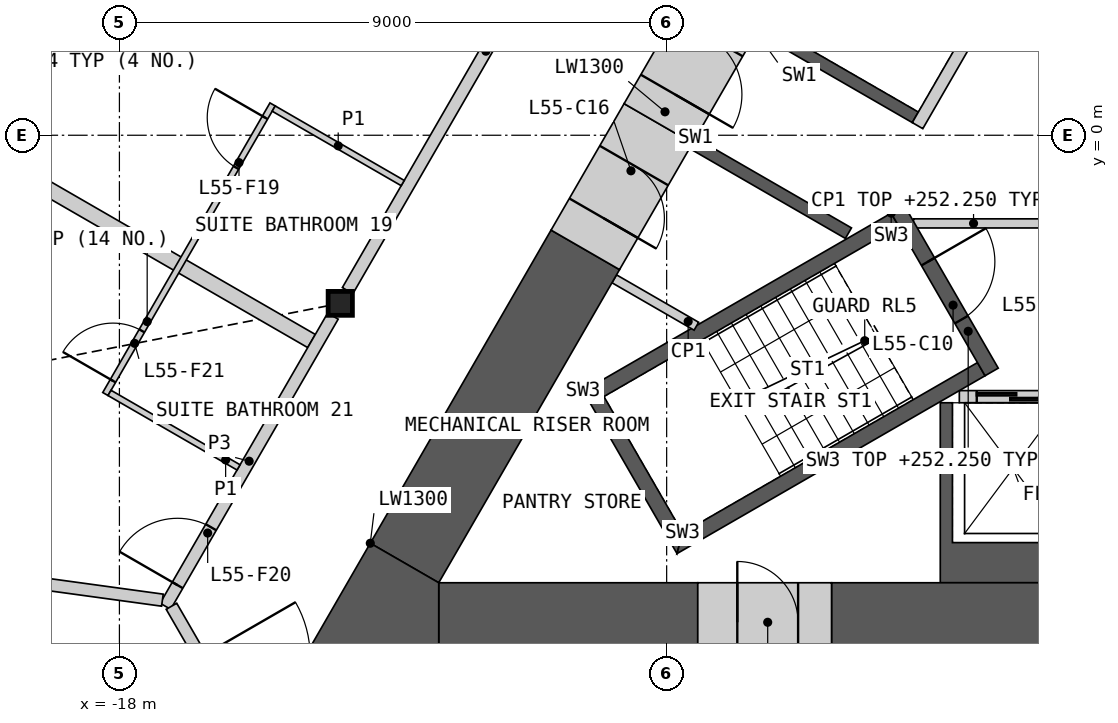
"""IFC4 building model, lengths in metres.
Left out: names, types, materials, properties, quantities, classifications, styles, units other than length and angle.
Written with IfcOpenShell. Run it as: python <this file> out.ifc"""

import sys

from ifc_helpers import new_model, si_unit, direction, frame, frame_2d, origin, origin_2d, place, context, subcontext, project, spatial, polyline, rectangle, i_section, outline, extrude, element, fill, save


model = new_model("IFC4")
c1 = context("Model", 3, precision=1e-05, world=origin(), true_north=direction((0.0, 1.0)))
c2 = subcontext(c1, "Body", "Model", "MODEL_VIEW")
j1 = project(units=[si_unit("LENGTHUNIT", "METRE"), si_unit("PLANEANGLEUNIT", "RADIAN")], contexts=[c1])
p1 = place(None, origin())
s1 = spatial("IfcSite", under=j1, at=p1, CompositionType="ELEMENT")
p2 = place(p1, origin())
s2 = spatial("IfcBuilding", under=s1, at=p2, CompositionType="ELEMENT")
p3 = place(p2, frame((0.0, 0.0, 249.0)))
s3 = spatial("IfcBuildingStorey", under=s2, at=p3, CompositionType="ELEMENT", Elevation=249.0)
p4 = place(p3, frame((-14.368, -2.765, 0.0), z_axis=(0.0, 0.0, 1.0), x_axis=(1.0, 0.0, 0.0)))
e1 = element("IfcColumn", 1, at=p4, inside=s3, PredefinedType="COLUMN", context=c2, shape_type="SweptSolid", body=[
    extrude(i_section(OverallWidth=0.399, OverallDepth=0.393, WebThickness=0.023, FlangeThickness=0.037, at=origin_2d()), origin(), (0.0, 0.0, 1.0), 3.6),
])
p5 = place(p3, origin())
e2 = element("IfcWall", 2, at=p5, inside=s3, PredefinedType="SHEAR", context=c2, shape_type="SweptSolid", body=[
    extrude(outline(polyline([(0.1, -7.36), (-4.5, -7.36), (-4.5, -4.4), (-4.3, -4.4), (-4.3, -6.7), (-2.3, -6.7), (-2.3, -4.4), (-2.1, -4.4), (-2.1, -6.7), (-0.1, -6.7), (-0.1, -4.4), (0.1, -4.4), (0.1, -7.36)])), origin(), (0.0, 0.0, 1.0), 3.25),
])
p6 = place(p3, frame((-4.187, -4.3, 0.0), z_axis=(0.0, 0.0, 1.0), x_axis=(1.0, 0.0, 0.0)))
e3 = element("IfcWall", 3, at=p6, inside=s3, PredefinedType="SOLIDWALL", context=c2, shape_type="SweptSolid", body=[
    extrude(rectangle(XDim=8.373, YDim=0.2, at=frame_2d((4.187, 0.0))), origin(), (0.0, 0.0, 1.0), 3.25),
])
p7 = place(p6, frame((0.287, 0.0, 0.0)))
e4 = element("IfcOpeningElement", 4, at=p7, cuts=e3, PredefinedType="OPENING", context=c2, shape_type="SweptSolid", body=[
    extrude(rectangle(XDim=1.2, YDim=2.1, at=frame_2d((0.6, 1.05))), frame((0.0, 0.11, 0.0), z_axis=(0.0, -1.0, 0.0), x_axis=(1.0, 0.0, 0.0)), (0.0, 0.0, 1.0), 0.22),
])
p8 = place(p6, frame((2.387, 0.0, 0.0)))
e5 = element("IfcOpeningElement", 5, at=p8, cuts=e3, PredefinedType="OPENING", context=c2, shape_type="SweptSolid", body=[
    extrude(rectangle(XDim=1.4, YDim=2.1, at=frame_2d((0.7, 1.05))), frame((0.0, 0.11, 0.0), z_axis=(0.0, -1.0, 0.0), x_axis=(1.0, 0.0, 0.0)), (0.0, 0.0, 1.0), 0.22),
])
p9 = place(p6, frame((4.837, 0.0, 0.0)))
e6 = element("IfcOpeningElement", 6, at=p9, cuts=e3, PredefinedType="OPENING", context=c2, shape_type="SweptSolid", body=[
    extrude(rectangle(XDim=0.9, YDim=2.1, at=frame_2d((0.45, 1.05))), frame((0.0, 0.11, 0.0), z_axis=(0.0, -1.0, 0.0), x_axis=(1.0, 0.0, 0.0)), (0.0, 0.0, 1.0), 0.22),
])
p10 = place(p6, frame((6.887, 0.0, 0.0)))
e7 = element("IfcOpeningElement", 7, at=p10, cuts=e3, PredefinedType="OPENING", context=c2, shape_type="SweptSolid", body=[
    extrude(rectangle(XDim=1.2, YDim=2.1, at=frame_2d((0.6, 1.05))), frame((0.0, 0.11, 0.0), z_axis=(0.0, -1.0, 0.0), x_axis=(1.0, 0.0, 0.0)), (0.0, 0.0, 1.0), 0.22),
])
p11 = place(p3, origin())
e8 = element("IfcWall", 8, at=p11, inside=s3, PredefinedType="SHEAR", context=c2, shape_type="SweptSolid", body=[
    extrude(outline(polyline([(-7.524, 1.688), (-4.124, 7.577), (-3.731, 7.35), (-1.561, 6.097), (-1.66, 5.924), (-3.652, 7.074), (-4.652, 5.342), (-2.66, 4.192), (-2.76, 4.019), (-4.752, 5.169), (-5.752, 3.437), (-3.76, 2.287), (-3.861, 2.113), (-5.852, 3.263), (-6.852, 1.531), (-4.861, 0.381), (-4.96, 0.208), (-7.131, 1.461), (-7.524, 1.688)])), origin(), (0.0, 0.0, 1.0), 3.25),
])
p12 = place(p3, origin())
e9 = element("IfcWall", 9, at=p12, inside=s3, PredefinedType="SHEAR", context=c2, shape_type="SweptSolid", body=[
    extrude(outline(polyline([(-8.524, -0.044), (-8.131, -0.271), (-5.96, -1.524), (-6.061, -1.697), (-8.231, -0.444), (-8.624, -0.217), (-8.524, -0.044)])), origin(), (0.0, 0.0, 1.0), 3.25),
])
p13 = place(p3, frame((-1.631, 5.776, 0.0), z_axis=(0.0, 0.0, 1.0), x_axis=(-0.499992876559, -0.866029516466, 0.0)))
e10 = element("IfcWall", 10, at=p13, inside=s3, PredefinedType="SOLIDWALL", context=c2, shape_type="SweptSolid", body=[
    extrude(rectangle(XDim=6.486, YDim=0.2, at=frame_2d((3.243, 0.0))), origin(), (0.0, 0.0, 1.0), 3.25),
])
p14 = place(p13, frame((0.337, 0.0, 0.0)))
e11 = element("IfcOpeningElement", 11, at=p14, cuts=e10, PredefinedType="OPENING", context=c2, shape_type="SweptSolid", body=[
    extrude(rectangle(XDim=1.1, YDim=2.1, at=frame_2d((0.55, 1.05))), frame((0.0, 0.11, 0.0), z_axis=(0.0, -1.0, 0.0), x_axis=(1.0, 0.0, 0.0)), (0.0, 0.0, 1.0), 0.22),
])
p15 = place(p13, frame((2.537, 0.0, 0.0)))
e12 = element("IfcOpeningElement", 12, at=p15, cuts=e10, PredefinedType="OPENING", context=c2, shape_type="SweptSolid", body=[
    extrude(rectangle(XDim=1.1, YDim=2.1, at=frame_2d((0.55, 1.05))), frame((0.0, 0.11, 0.0), z_axis=(0.0, -1.0, 0.0), x_axis=(1.0, 0.0, 0.0)), (0.0, 0.0, 1.0), 0.22),
])
p16 = place(p3, frame((-4.941, -1.45, 0.0), z_axis=(0.0, 0.0, 1.0), x_axis=(1.0, 0.0, 0.0)))
e13 = element("IfcWall", 13, at=p16, inside=s3, PredefinedType="PARTITIONING", context=c2, shape_type="SweptSolid", body=[
    extrude(rectangle(XDim=9.882, YDim=0.15, at=frame_2d((4.941, 0.0))), origin(), (0.0, 0.0, 1.0), 3.25),
])
p17 = place(p16, frame((4.391, 0.0, 0.0)))
e14 = element("IfcOpeningElement", 14, at=p17, cuts=e13, PredefinedType="OPENING", context=c2, shape_type="SweptSolid", body=[
    extrude(rectangle(XDim=1.1, YDim=2.1, at=frame_2d((0.55, 1.05))), frame((0.0, 0.085, 0.0), z_axis=(0.0, -1.0, 0.0), x_axis=(1.0, 0.0, 0.0)), (0.0, 0.0, 1.0), 0.17),
])
p18 = place(p3, origin())
e15 = element("IfcWall", 15, at=p18, inside=s3, PredefinedType="SHEAR", context=c2, shape_type="SweptSolid", body=[
    extrude(outline(polyline([(-5.307, -1.281), (-10.374, -4.206), (-10.032, -4.298), (-5.182, -1.498), (-5.307, -1.281)])), origin(), (0.0, 0.0, 1.0), 3.25),
])
p19 = place(p3, origin())
e16 = element("IfcWall", 16, at=p19, inside=s3, PredefinedType="SHEAR", context=c2, shape_type="SweptSolid", body=[
    extrude(outline(polyline([(-10.374, -4.206), (-8.83, -6.881), (-8.738, -6.539), (-10.032, -4.298), (-10.374, -4.206)])), origin(), (0.0, 0.0, 1.0), 3.25),
])
p20 = place(p3, origin())
e17 = element("IfcWall", 17, at=p20, inside=s3, PredefinedType="SHEAR", context=c2, shape_type="SweptSolid", body=[
    extrude(outline(polyline([(-8.738, -6.539), (-8.83, -6.881), (-3.763, -3.956), (-3.888, -3.739), (-8.738, -6.539)])), origin(), (0.0, 0.0, 1.0), 3.25),
])
p21 = place(p3, frame((-5.199, -1.219, 0.0), z_axis=(0.0, 0.0, 1.0), x_axis=(0.499982516597, -0.866035497597, 0.0)))
e18 = element("IfcWall", 18, at=p21, inside=s3, PredefinedType="SHEAR", context=c2, shape_type="SweptSolid", body=[
    extrude(rectangle(XDim=3.088, YDim=0.25, at=frame_2d((1.544, 0.0))), origin(), (0.0, 0.0, 1.0), 3.25),
])
p22 = place(p21, frame((0.994, 0.0, 0.0)))
e19 = element("IfcOpeningElement", 19, at=p22, cuts=e18, PredefinedType="OPENING", context=c2, shape_type="SweptSolid", body=[
    extrude(rectangle(XDim=1.1, YDim=2.1, at=frame_2d((0.55, 1.05))), frame((0.0, 0.135, 0.0), z_axis=(0.0, -1.0, 0.0), x_axis=(1.0, 0.0, 0.0)), (0.0, 0.0, 1.0), 0.27),
])
p23 = place(p3, frame((-9.862, -2.361, 0.0), z_axis=(0.0, 0.0, 1.0), x_axis=(0.865990094875, -0.500061151839, 0.0)))
e20 = element("IfcWall", 20, at=p23, inside=s3, PredefinedType="PARTITIONING", context=c2, shape_type="SweptSolid", body=[
    extrude(rectangle(XDim=1.56, YDim=0.15, at=frame_2d((0.78, 0.0))), origin(), (0.0, 0.0, 1.0), 3.25),
])
p24 = place(p3, frame((-6.288, -8.01, 0.0), z_axis=(0.0, 0.0, 1.0), x_axis=(1.0, 0.0, 0.0)))
e21 = element("IfcWall", 21, at=p24, inside=s3, PredefinedType="SHEAR", context=c2, shape_type="SweptSolid", body=[
    extrude(rectangle(XDim=12.576, YDim=1.3, at=frame_2d((6.288, 0.0))), origin(), (0.0, 0.0, 1.0), 3.25),
])
p25 = place(p3, frame((-12.748, -8.01, 0.0), z_axis=(0.0, 0.0, 1.0), x_axis=(1.0, 0.0, 0.0)))
e22 = element("IfcWall", 22, at=p25, inside=s3, PredefinedType="SHEAR", context=c2, shape_type="SweptSolid", body=[
    extrude(rectangle(XDim=4.26, YDim=1.3, at=frame_2d((2.13, 0.0))), origin(), (0.0, 0.0, 1.0), 3.25),
])
p26 = place(p3, frame((-10.338, -1.885, 0.0), z_axis=(0.0, 0.0, 1.0), x_axis=(-0.499975944838, -0.866039291593, 0.0)))
e23 = element("IfcWall", 23, at=p26, inside=s3, PredefinedType="SHEAR", context=c2, shape_type="SweptSolid", body=[
    extrude(rectangle(XDim=5.947, YDim=1.3, at=frame_2d((2.974, 0.0))), origin(), (0.0, 0.0, 1.0), 3.25),
])
p27 = place(p3, origin())
e24 = element("IfcWall", 24, at=p27, inside=s3, PredefinedType="SHEAR", context=c2, shape_type="SweptSolid", body=[
    extrude(outline(polyline([(-13.874, -6.71), (-12.748, -7.36), (-12.748, -8.66), (-15.0, -8.66), (-13.874, -6.71)])), origin(), (0.0, 0.0, 1.0), 3.25),
])
p28 = place(p3, frame((-8.488, -8.01, 0.0), z_axis=(0.0, 0.0, 1.0), x_axis=(1.0, 0.0, 0.0)))
e25 = element("IfcWall", 25, at=p28, inside=s3, PredefinedType="SHEAR", context=c2, shape_type="SweptSolid", body=[
    extrude(rectangle(XDim=2.2, YDim=1.3, at=frame_2d((1.1, 0.0))), origin(), (0.0, 0.0, 1.0), 3.25),
])
p29 = place(p28, frame((0.65, 0.0, 0.0)))
e26 = element("IfcOpeningElement", 26, at=p29, cuts=e25, PredefinedType="OPENING", context=c2, shape_type="SweptSolid", body=[
    extrude(rectangle(XDim=1.0, YDim=2.1, at=frame_2d((0.5, 1.05))), frame((0.0, 0.66, 0.0), z_axis=(0.0, -1.0, 0.0), x_axis=(1.0, 0.0, 0.0)), (0.0, 0.0, 1.0), 1.32),
])
p30 = place(p3, frame((-9.137, 0.195, 0.0), z_axis=(0.0, 0.0, 1.0), x_axis=(-0.500009943768, -0.866019662671, 0.0)))
e27 = element("IfcWall", 27, at=p30, inside=s3, PredefinedType="SHEAR", context=c2, shape_type="SweptSolid", body=[
    extrude(rectangle(XDim=2.401, YDim=1.3, at=frame_2d((1.201, 0.0))), origin(), (0.0, 0.0, 1.0), 3.25),
])
p31 = place(p30, frame((0.8, 0.0, 0.0)))
e28 = element("IfcOpeningElement", 28, at=p31, cuts=e27, PredefinedType="OPENING", context=c2, shape_type="SweptSolid", body=[
    extrude(rectangle(XDim=1.0, YDim=2.1, at=frame_2d((0.5, 1.05))), frame((0.0, 0.66, 0.0), z_axis=(0.0, -1.0, 0.0), x_axis=(1.0, 0.0, 0.0)), (0.0, 0.0, 1.0), 1.32),
])
p32 = place(p3, frame((-8.037, 2.1, 0.0), z_axis=(0.0, 0.0, 1.0), x_axis=(-0.50002983664, -0.866008176907, 0.0)))
e29 = element("IfcWall", 29, at=p32, inside=s3, PredefinedType="SHEAR", context=c2, shape_type="SweptSolid", body=[
    extrude(rectangle(XDim=2.2, YDim=1.3, at=frame_2d((1.1, 0.0))), origin(), (0.0, 0.0, 1.0), 3.25),
])
p33 = place(p32, frame((0.55, 0.0, 0.0)))
e30 = element("IfcOpeningElement", 30, at=p33, cuts=e29, PredefinedType="OPENING", context=c2, shape_type="SweptSolid", body=[
    extrude(rectangle(XDim=1.1, YDim=2.1, at=frame_2d((0.55, 1.05))), frame((0.0, 0.66, 0.0), z_axis=(0.0, -1.0, 0.0), x_axis=(1.0, 0.0, 0.0)), (0.0, 0.0, 1.0), 1.32),
])
p34 = place(p3, frame((-25.515, 2.778, 0.0), z_axis=(0.0, 0.0, 1.0), x_axis=(0.866019666699, -0.500009936792, 0.0)))
e31 = element("IfcWall", 31, at=p34, inside=s3, PredefinedType="PARTITIONING", context=c2, shape_type="SweptSolid", body=[
    extrude(rectangle(XDim=12.325, YDim=0.25, at=frame_2d((6.163, 0.0))), origin(), (0.0, 0.0, 1.0), 2.404),
])
p35 = place(p3, frame((-14.247, -2.556, 0.0), z_axis=(0.0, 0.0, 1.0), x_axis=(0.49998193945, 0.866035830797, 0.0)))
e32 = element("IfcWall", 32, at=p35, inside=s3, PredefinedType="PARTITIONING", context=c2, shape_type="SweptSolid", body=[
    extrude(rectangle(XDim=9.094, YDim=0.2, at=frame_2d((4.547, 0.0))), origin(), (0.0, 0.0, 1.0), 3.25),
])
p36 = place(p35, frame((6.833, 0.0, 0.0)))
e33 = element("IfcOpeningElement", 33, at=p36, cuts=e32, PredefinedType="OPENING", context=c2, shape_type="SweptSolid", body=[
    extrude(rectangle(XDim=1.1, YDim=2.1, at=frame_2d((0.55, 1.05))), frame((0.0, 0.11, 0.0), z_axis=(0.0, -1.0, 0.0), x_axis=(1.0, 0.0, 0.0)), (0.0, 0.0, 1.0), 0.22),
])
p37 = place(p3, frame((-17.244, -7.747, 0.0), z_axis=(0.0, 0.0, 1.0), x_axis=(0.500017753321, 0.866015153657, 0.0)))
e34 = element("IfcWall", 34, at=p37, inside=s3, PredefinedType="PARTITIONING", context=c2, shape_type="SweptSolid", body=[
    extrude(rectangle(XDim=5.51, YDim=0.2, at=frame_2d((2.755, 0.0))), origin(), (0.0, 0.0, 1.0), 3.25),
])
p38 = place(p37, frame((0.401, 0.0, 0.0)))
e35 = element("IfcOpeningElement", 35, at=p38, cuts=e34, PredefinedType="OPENING", context=c2, shape_type="SweptSolid", body=[
    extrude(rectangle(XDim=1.1, YDim=2.1, at=frame_2d((0.55, 1.05))), frame((0.0, 0.11, 0.0), z_axis=(0.0, -1.0, 0.0), x_axis=(1.0, 0.0, 0.0)), (0.0, 0.0, 1.0), 0.22),
])
p39 = place(p3, frame((-17.144, -7.747, 0.0), z_axis=(0.0, 0.0, 1.0), x_axis=(0.499961815444, -0.866047448526, 0.0)))
e36 = element("IfcWall", 36, at=p39, inside=s3, PredefinedType="PARTITIONING", context=c2, shape_type="SweptSolid", body=[
    extrude(rectangle(XDim=3.826, YDim=0.2, at=frame_2d((1.913, 0.0))), origin(), (0.0, 0.0, 1.0), 3.25),
])
p40 = place(p39, frame((0.962, 0.0, 0.0)))
e37 = element("IfcOpeningElement", 37, at=p40, cuts=e36, PredefinedType="OPENING", context=c2, shape_type="SweptSolid", body=[
    extrude(rectangle(XDim=1.8, YDim=2.1, at=frame_2d((0.9, 1.05))), frame((0.0, 0.11, 0.0), z_axis=(0.0, -1.0, 0.0), x_axis=(1.0, 0.0, 0.0)), (0.0, 0.0, 1.0), 0.22),
])
p41 = place(p3, frame((-30.703, -5.81, 0.0), z_axis=(0.0, 0.0, 1.0), x_axis=(0.99075075074, -0.135694325259, 0.0)))
e38 = element("IfcWall", 38, at=p41, inside=s3, PredefinedType="PARTITIONING", context=c2, shape_type="SweptSolid", body=[
    extrude(rectangle(XDim=13.535, YDim=0.2, at=frame_2d((6.768, 0.0))), origin(), (0.0, 0.0, 1.0), 2.404),
])
p42 = place(p3, frame((-18.231, -4.256, 0.0), z_axis=(0.0, 0.0, 1.0), x_axis=(0.500015767406, 0.866016300277, 0.0)))
e39 = element("IfcWall", 39, at=p42, inside=s3, PredefinedType="PARTITIONING", context=c2, shape_type="SweptSolid", body=[
    extrude(rectangle(XDim=5.5, YDim=0.1, at=frame_2d((2.75, 0.0))), origin(), (0.0, 0.0, 1.0), 2.404),
])
p43 = place(p42, frame((4.3, 0.0, 0.0)))
e40 = element("IfcOpeningElement", 40, at=p43, cuts=e39, PredefinedType="OPENING", context=c2, shape_type="SweptSolid", body=[
    extrude(rectangle(XDim=0.95, YDim=2.1, at=frame_2d((0.475, 1.05))), frame((0.0, 0.06, 0.0), z_axis=(0.0, -1.0, 0.0), x_axis=(1.0, 0.0, 0.0)), (0.0, 0.0, 1.0), 0.12),
])
p44 = place(p42, frame((0.25, 0.0, 0.0)))
e41 = element("IfcOpeningElement", 41, at=p44, cuts=e39, PredefinedType="OPENING", context=c2, shape_type="SweptSolid", body=[
    extrude(rectangle(XDim=0.95, YDim=2.1, at=frame_2d((0.475, 1.05))), frame((0.0, 0.06, 0.0), z_axis=(0.0, -1.0, 0.0), x_axis=(1.0, 0.0, 0.0)), (0.0, 0.0, 1.0), 0.12),
])
p45 = place(p3, frame((-15.462, 0.439, 0.0), z_axis=(0.0, 0.0, 1.0), x_axis=(0.865989751695, -0.500061746146, 0.0)))
e42 = element("IfcWall", 42, at=p45, inside=s3, PredefinedType="PARTITIONING", context=c2, shape_type="SweptSolid", body=[
    extrude(rectangle(XDim=2.45, YDim=0.1, at=frame_2d((1.225, 0.0))), origin(), (0.0, 0.0, 1.0), 2.404),
])
p46 = place(p3, frame((-18.163, -4.238, 0.0), z_axis=(0.0, 0.0, 1.0), x_axis=(0.866014668023, -0.500018594424, 0.0)))
e43 = element("IfcWall", 43, at=p46, inside=s3, PredefinedType="PARTITIONING", context=c2, shape_type="SweptSolid", body=[
    extrude(rectangle(XDim=2.45, YDim=0.1, at=frame_2d((1.225, 0.0))), origin(), (0.0, 0.0, 1.0), 2.404),
])
p47 = place(p7, origin())
e44 = element("IfcDoor", 44, at=p47, inside=s3, OperationType="SLIDING_TO_LEFT", PredefinedType="DOOR", context=c2, shape_type="SweptSolid", body=[
    extrude(rectangle(XDim=1.2, YDim=2.1, at=frame_2d((0.6, 1.05))), frame((0.0, 0.025, 0.0), z_axis=(0.0, -1.0, 0.0), x_axis=(1.0, 0.0, 0.0)), (0.0, 0.0, 1.0), 0.05),
])
fill(e4, e44)
p48 = place(p22, origin())
e45 = element("IfcDoor", 45, at=p48, inside=s3, OperationType="SINGLE_SWING_LEFT", PredefinedType="DOOR", context=c2, shape_type="SweptSolid", body=[
    extrude(rectangle(XDim=1.1, YDim=2.1, at=frame_2d((0.55, 1.05))), frame((0.0, 0.025, 0.0), z_axis=(0.0, -1.0, 0.0), x_axis=(1.0, 0.0, 0.0)), (0.0, 0.0, 1.0), 0.05),
])
fill(e19, e45)
p49 = place(p29, origin())
e46 = element("IfcDoor", 46, at=p49, inside=s3, OperationType="SINGLE_SWING_LEFT", PredefinedType="DOOR", context=c2, shape_type="SweptSolid", body=[
    extrude(rectangle(XDim=1.0, YDim=2.1, at=frame_2d((0.5, 1.05))), frame((0.0, 0.405, 0.0), z_axis=(0.0, -1.0, 0.0), x_axis=(1.0, 0.0, 0.0)), (0.0, 0.0, 1.0), 0.05),
])
fill(e26, e46)
p50 = place(p31, origin())
e47 = element("IfcDoor", 47, at=p50, inside=s3, OperationType="SINGLE_SWING_RIGHT", PredefinedType="DOOR", context=c2, shape_type="SweptSolid", body=[
    extrude(rectangle(XDim=1.0, YDim=2.1, at=frame_2d((0.5, 1.05))), frame((0.0, 0.405, 0.0), z_axis=(0.0, -1.0, 0.0), x_axis=(1.0, 0.0, 0.0)), (0.0, 0.0, 1.0), 0.05),
])
fill(e28, e47)
p51 = place(p33, origin())
e48 = element("IfcDoor", 48, at=p51, inside=s3, OperationType="SINGLE_SWING_RIGHT", PredefinedType="DOOR", context=c2, shape_type="SweptSolid", body=[
    extrude(rectangle(XDim=1.1, YDim=2.1, at=frame_2d((0.55, 1.05))), frame((0.0, 0.405, 0.0), z_axis=(0.0, -1.0, 0.0), x_axis=(1.0, 0.0, 0.0)), (0.0, 0.0, 1.0), 0.05),
])
fill(e30, e48)
p52 = place(p43, origin())
e49 = element("IfcDoor", 49, at=p52, inside=s3, OperationType="SINGLE_SWING_RIGHT", PredefinedType="DOOR", context=c2, shape_type="SweptSolid", body=[
    extrude(rectangle(XDim=0.95, YDim=2.1, at=frame_2d((0.475, 1.05))), frame((0.0, 0.025, 0.0), z_axis=(0.0, -1.0, 0.0), x_axis=(1.0, 0.0, 0.0)), (0.0, 0.0, 1.0), 0.05),
])
fill(e40, e49)
p53 = place(p38, origin())
e50 = element("IfcDoor", 50, at=p53, inside=s3, OperationType="SINGLE_SWING_LEFT", PredefinedType="DOOR", context=c2, shape_type="SweptSolid", body=[
    extrude(rectangle(XDim=1.1, YDim=2.1, at=frame_2d((0.55, 1.05))), frame((0.0, 0.025, 0.0), z_axis=(0.0, -1.0, 0.0), x_axis=(1.0, 0.0, 0.0)), (0.0, 0.0, 1.0), 0.05),
])
fill(e35, e50)
p54 = place(p44, origin())
e51 = element("IfcDoor", 51, at=p54, inside=s3, OperationType="SINGLE_SWING_LEFT", PredefinedType="DOOR", context=c2, shape_type="SweptSolid", body=[
    extrude(rectangle(XDim=0.95, YDim=2.1, at=frame_2d((0.475, 1.05))), frame((0.0, 0.025, 0.0), z_axis=(0.0, -1.0, 0.0), x_axis=(1.0, 0.0, 0.0)), (0.0, 0.0, 1.0), 0.05),
])
fill(e41, e51)
save(model, sys.argv[1])
